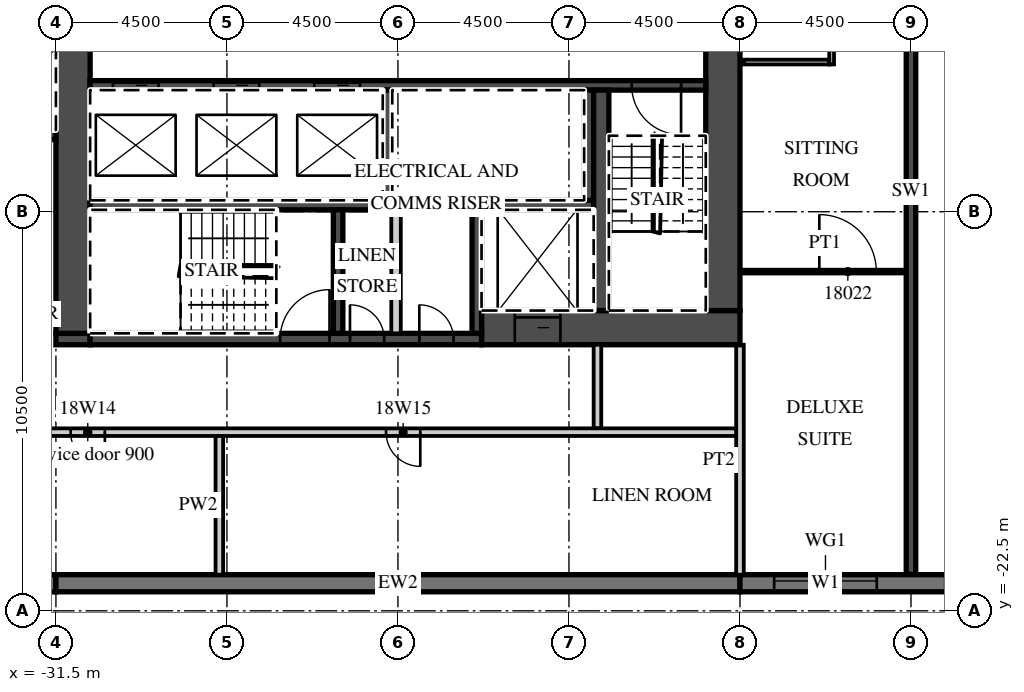
"""IFC4 building model, lengths in metres.
Left out: names, types, materials, properties, quantities, classifications, styles, units other than length and angle.
Written with IfcOpenShell. Run it as: python <this file> out.ifc"""

import sys

from ifc_helpers import new_model, si_unit, direction, frame, frame_2d, origin, place, context, subcontext, project, spatial, rectangle, extrude, element, fill, save


model = new_model("IFC4")
c1 = context("Model", 3, precision=1e-05, world=origin(), true_north=direction((0.0, 1.0)))
c2 = subcontext(c1, "Body", "Model", "MODEL_VIEW")
j1 = project(units=[si_unit("LENGTHUNIT", "METRE"), si_unit("PLANEANGLEUNIT", "RADIAN")], contexts=[c1])
p1 = place(None, origin())
s1 = spatial("IfcSite", under=j1, at=p1, CompositionType="ELEMENT")
p2 = place(p1, origin())
s2 = spatial("IfcBuilding", under=s1, at=p2, CompositionType="ELEMENT")
p3 = place(p2, frame((0.0, 0.0, 89.7)))
s3 = spatial("IfcBuildingStorey", under=s2, at=p3, CompositionType="ELEMENT", Elevation=89.7)
p4 = place(p3, frame((-9.0, -21.54, 0.0), z_axis=(0.0, 0.0, 1.0), x_axis=(0.0, 1.0, 0.0)))
e1 = element("IfcWall", 1, at=p4, inside=s3, PredefinedType="SHEAR", context=c2, shape_type="SweptSolid", body=[
    extrude(rectangle(XDim=20.14, YDim=0.25, at=frame_2d((10.07, 0.0))), origin(), (0.0, 0.0, 1.0), 3.3),
])
p5 = place(p3, frame((-41.0, -21.775, 0.0), z_axis=(0.0, 0.0, 1.0), x_axis=(1.0, 0.0, 0.0)))
e2 = element("IfcWall", 2, at=p5, inside=s3, PredefinedType="SOLIDWALL", context=c2, shape_type="SweptSolid", body=[
    extrude(rectangle(XDim=9.5, YDim=0.45, at=frame_2d((4.75, 0.0))), origin(), (0.0, 0.0, 1.0), 3.02),
])
p6 = place(p3, frame((-31.5, -21.775, 0.0), z_axis=(0.0, 0.0, 1.0), x_axis=(1.0, 0.0, 0.0)))
e3 = element("IfcWall", 3, at=p6, inside=s3, PredefinedType="SOLIDWALL", context=c2, shape_type="SweptSolid", body=[
    extrude(rectangle(XDim=18.0, YDim=0.45, at=frame_2d((9.0, 0.0))), origin(), (0.0, 0.0, 1.0), 3.02),
])
p7 = place(p3, frame((-13.5, -21.775, 0.0), z_axis=(0.0, 0.0, 1.0), x_axis=(1.0, 0.0, 0.0)))
e4 = element("IfcWall", 4, at=p7, inside=s3, PredefinedType="SOLIDWALL", context=c2, shape_type="SweptSolid", body=[
    extrude(rectangle(XDim=54.5, YDim=0.45, at=frame_2d((27.25, 0.0))), origin(), (0.0, 0.0, 1.0), 3.02),
])
p8 = place(p7, frame((0.9, 0.0, 0.45)))
e5 = element("IfcOpeningElement", 5, at=p8, cuts=e4, PredefinedType="OPENING", context=c2, shape_type="SweptSolid", body=[
    extrude(rectangle(XDim=2.7, YDim=2.25, at=frame_2d((1.35, 1.125))), frame((0.0, 0.235, 0.0), z_axis=(0.0, -1.0, 0.0), x_axis=(1.0, 0.0, 0.0)), (0.0, 0.0, 1.0), 0.47),
])
p9 = place(p7, frame((5.4, 0.0, 0.45)))
e6 = element("IfcOpeningElement", 6, at=p9, cuts=e4, PredefinedType="OPENING", context=c2, shape_type="SweptSolid", body=[
    extrude(rectangle(XDim=2.7, YDim=2.25, at=frame_2d((1.35, 1.125))), frame((0.0, 0.235, 0.0), z_axis=(0.0, -1.0, 0.0), x_axis=(1.0, 0.0, 0.0)), (0.0, 0.0, 1.0), 0.47),
])
p10 = place(p7, frame((9.9, 0.0, 0.45)))
e7 = element("IfcOpeningElement", 7, at=p10, cuts=e4, PredefinedType="OPENING", context=c2, shape_type="SweptSolid", body=[
    extrude(rectangle(XDim=2.7, YDim=2.25, at=frame_2d((1.35, 1.125))), frame((0.0, 0.235, 0.0), z_axis=(0.0, -1.0, 0.0), x_axis=(1.0, 0.0, 0.0)), (0.0, 0.0, 1.0), 0.47),
])
p11 = place(p7, frame((14.4, 0.0, 0.45)))
e8 = element("IfcOpeningElement", 8, at=p11, cuts=e4, PredefinedType="OPENING", context=c2, shape_type="SweptSolid", body=[
    extrude(rectangle(XDim=2.7, YDim=2.25, at=frame_2d((1.35, 1.125))), frame((0.0, 0.235, 0.0), z_axis=(0.0, -1.0, 0.0), x_axis=(1.0, 0.0, 0.0)), (0.0, 0.0, 1.0), 0.47),
])
p12 = place(p7, frame((18.9, 0.0, 0.45)))
e9 = element("IfcOpeningElement", 9, at=p12, cuts=e4, PredefinedType="OPENING", context=c2, shape_type="SweptSolid", body=[
    extrude(rectangle(XDim=2.7, YDim=2.25, at=frame_2d((1.35, 1.125))), frame((0.0, 0.235, 0.0), z_axis=(0.0, -1.0, 0.0), x_axis=(1.0, 0.0, 0.0)), (0.0, 0.0, 1.0), 0.47),
])
p13 = place(p7, frame((23.4, 0.0, 0.45)))
e10 = element("IfcOpeningElement", 10, at=p13, cuts=e4, PredefinedType="OPENING", context=c2, shape_type="SweptSolid", body=[
    extrude(rectangle(XDim=2.7, YDim=2.25, at=frame_2d((1.35, 1.125))), frame((0.0, 0.235, 0.0), z_axis=(0.0, -1.0, 0.0), x_axis=(1.0, 0.0, 0.0)), (0.0, 0.0, 1.0), 0.47),
])
p14 = place(p7, frame((27.9, 0.0, 0.45)))
e11 = element("IfcOpeningElement", 11, at=p14, cuts=e4, PredefinedType="OPENING", context=c2, shape_type="SweptSolid", body=[
    extrude(rectangle(XDim=2.7, YDim=2.25, at=frame_2d((1.35, 1.125))), frame((0.0, 0.235, 0.0), z_axis=(0.0, -1.0, 0.0), x_axis=(1.0, 0.0, 0.0)), (0.0, 0.0, 1.0), 0.47),
])
p15 = place(p7, frame((32.4, 0.0, 0.45)))
e12 = element("IfcOpeningElement", 12, at=p15, cuts=e4, PredefinedType="OPENING", context=c2, shape_type="SweptSolid", body=[
    extrude(rectangle(XDim=2.7, YDim=2.25, at=frame_2d((1.35, 1.125))), frame((0.0, 0.235, 0.0), z_axis=(0.0, -1.0, 0.0), x_axis=(1.0, 0.0, 0.0)), (0.0, 0.0, 1.0), 0.47),
])
p16 = place(p7, frame((36.9, 0.0, 0.45)))
e13 = element("IfcOpeningElement", 13, at=p16, cuts=e4, PredefinedType="OPENING", context=c2, shape_type="SweptSolid", body=[
    extrude(rectangle(XDim=2.7, YDim=2.25, at=frame_2d((1.35, 1.125))), frame((0.0, 0.235, 0.0), z_axis=(0.0, -1.0, 0.0), x_axis=(1.0, 0.0, 0.0)), (0.0, 0.0, 1.0), 0.47),
])
p17 = place(p7, frame((41.4, 0.0, 0.45)))
e14 = element("IfcOpeningElement", 14, at=p17, cuts=e4, PredefinedType="OPENING", context=c2, shape_type="SweptSolid", body=[
    extrude(rectangle(XDim=2.7, YDim=2.25, at=frame_2d((1.35, 1.125))), frame((0.0, 0.235, 0.0), z_axis=(0.0, -1.0, 0.0), x_axis=(1.0, 0.0, 0.0)), (0.0, 0.0, 1.0), 0.47),
])
p18 = place(p7, frame((45.9, 0.0, 0.45)))
e15 = element("IfcOpeningElement", 15, at=p18, cuts=e4, PredefinedType="OPENING", context=c2, shape_type="SweptSolid", body=[
    extrude(rectangle(XDim=2.7, YDim=2.25, at=frame_2d((1.35, 1.125))), frame((0.0, 0.235, 0.0), z_axis=(0.0, -1.0, 0.0), x_axis=(1.0, 0.0, 0.0)), (0.0, 0.0, 1.0), 0.47),
])
p19 = place(p7, frame((50.4, 0.0, 0.45)))
e16 = element("IfcOpeningElement", 16, at=p19, cuts=e4, PredefinedType="OPENING", context=c2, shape_type="SweptSolid", body=[
    extrude(rectangle(XDim=2.7, YDim=2.25, at=frame_2d((1.35, 1.125))), frame((0.0, 0.235, 0.0), z_axis=(0.0, -1.0, 0.0), x_axis=(1.0, 0.0, 0.0)), (0.0, 0.0, 1.0), 0.47),
])
p20 = place(p3, frame((-13.5, -21.55, 0.0), z_axis=(0.0, 0.0, 1.0), x_axis=(0.0, 1.0, 0.0)))
e17 = element("IfcWall", 17, at=p20, inside=s3, PredefinedType="PARTITIONING", context=c2, shape_type="SweptSolid", body=[
    extrude(rectangle(XDim=6.05, YDim=0.2, at=frame_2d((3.025, 0.0))), origin(), (0.0, 0.0, 1.0), 3.02),
])
p21 = place(p3, frame((-11.088, -8.125, 0.0), z_axis=(0.0, 0.0, 1.0), x_axis=(0.0, 1.0, 0.0)))
e18 = element("IfcWall", 18, at=p21, inside=s3, PredefinedType="PARTITIONING", context=c2, shape_type="SweptSolid", body=[
    extrude(rectangle(XDim=6.725, YDim=0.125, at=frame_2d((3.363, 0.0))), origin(), (0.0, 0.0, 1.0), 3.02),
])
p22 = place(p21, frame((3.375, 0.0, 0.0)))
e19 = element("IfcOpeningElement", 19, at=p22, cuts=e18, PredefinedType="OPENING", context=c2, shape_type="SweptSolid", body=[
    extrude(rectangle(XDim=0.9, YDim=2.1, at=frame_2d((0.45, 1.05))), frame((0.0, 0.073, 0.0), z_axis=(0.0, -1.0, 0.0), x_axis=(1.0, 0.0, 0.0)), (0.0, 0.0, 1.0), 0.145),
])
p23 = place(p3, frame((-13.4, -8.062, 0.0), z_axis=(0.0, 0.0, 1.0), x_axis=(1.0, 0.0, 0.0)))
e20 = element("IfcWall", 20, at=p23, inside=s3, PredefinedType="PARTITIONING", context=c2, shape_type="SweptSolid", body=[
    extrude(rectangle(XDim=2.25, YDim=0.125, at=frame_2d((1.125, 0.0))), origin(), (0.0, 0.0, 1.0), 3.02),
])
p24 = place(p3, frame((-13.4, -13.575, 0.0), z_axis=(0.0, 0.0, 1.0), x_axis=(1.0, 0.0, 0.0)))
e21 = element("IfcWall", 21, at=p24, inside=s3, PredefinedType="PARTITIONING", context=c2, shape_type="SweptSolid", body=[
    extrude(rectangle(XDim=4.275, YDim=0.1, at=frame_2d((2.137, 0.0))), origin(), (0.0, 0.0, 1.0), 3.02),
])
p25 = place(p24, frame((1.988, 0.0, 0.0)))
e22 = element("IfcOpeningElement", 22, at=p25, cuts=e21, PredefinedType="OPENING", context=c2, shape_type="SweptSolid", body=[
    extrude(rectangle(XDim=1.5, YDim=2.1, at=frame_2d((0.75, 1.05))), frame((0.0, 0.06, 0.0), z_axis=(0.0, -1.0, 0.0), x_axis=(1.0, 0.0, 0.0)), (0.0, 0.0, 1.0), 0.12),
])
p26 = place(p3, frame((-20.3, -15.05, 0.0), z_axis=(0.0, 0.0, 1.0), x_axis=(1.0, 0.0, 0.0)))
e23 = element("IfcWall", 23, at=p26, inside=s3, PredefinedType="SHEAR", context=c2, shape_type="SweptSolid", body=[
    extrude(rectangle(XDim=6.8, YDim=0.9, at=frame_2d((3.4, 0.0))), origin(), (0.0, 0.0, 1.0), 3.02),
])
p27 = place(p26, frame((0.875, 0.0, 0.0)))
e24 = element("IfcOpeningElement", 24, at=p27, cuts=e23, PredefinedType="OPENING", context=c2, shape_type="SweptSolid", body=[
    extrude(rectangle(XDim=1.2, YDim=2.1, at=frame_2d((0.6, 1.05))), frame((0.0, 0.46, 0.0), z_axis=(0.0, -1.0, 0.0), x_axis=(1.0, 0.0, 0.0)), (0.0, 0.0, 1.0), 0.92),
])
p28 = place(p3, frame((-31.5, -15.35, 0.0), z_axis=(0.0, 0.0, 1.0), x_axis=(1.0, 0.0, 0.0)))
e25 = element("IfcWall", 25, at=p28, inside=s3, PredefinedType="SHEAR", context=c2, shape_type="SweptSolid", body=[
    extrude(rectangle(XDim=0.9, YDim=0.3, at=frame_2d((0.45, 0.0))), origin(), (0.0, 0.0, 1.0), 3.02),
])
p29 = place(p3, frame((-30.6, -15.35, 0.0), z_axis=(0.0, 0.0, 1.0), x_axis=(1.0, 0.0, 0.0)))
e26 = element("IfcWall", 26, at=p29, inside=s3, PredefinedType="SHEAR", context=c2, shape_type="SweptSolid", body=[
    extrude(rectangle(XDim=10.3, YDim=0.3, at=frame_2d((5.15, 0.0))), origin(), (0.0, 0.0, 1.0), 3.02),
])
p30 = place(p29, frame((5.0, 0.0, 0.0)))
e27 = element("IfcOpeningElement", 27, at=p30, cuts=e26, PredefinedType="OPENING", context=c2, shape_type="SweptSolid", body=[
    extrude(rectangle(XDim=1.3, YDim=2.1, at=frame_2d((0.65, 1.05))), frame((0.0, 0.16, 0.0), z_axis=(0.0, -1.0, 0.0), x_axis=(1.0, 0.0, 0.0)), (0.0, 0.0, 1.0), 0.32),
])
p31 = place(p29, frame((6.837, 0.0, 0.0)))
e28 = element("IfcOpeningElement", 28, at=p31, cuts=e26, PredefinedType="OPENING", context=c2, shape_type="SweptSolid", body=[
    extrude(rectangle(XDim=0.9, YDim=2.1, at=frame_2d((0.45, 1.05))), frame((0.0, 0.16, 0.0), z_axis=(0.0, -1.0, 0.0), x_axis=(1.0, 0.0, 0.0)), (0.0, 0.0, 1.0), 0.32),
])
p32 = place(p29, frame((8.663, 0.0, 0.0)))
e29 = element("IfcOpeningElement", 29, at=p32, cuts=e26, PredefinedType="OPENING", context=c2, shape_type="SweptSolid", body=[
    extrude(rectangle(XDim=0.9, YDim=2.1, at=frame_2d((0.45, 1.05))), frame((0.0, 0.16, 0.0), z_axis=(0.0, -1.0, 0.0), x_axis=(1.0, 0.0, 0.0)), (0.0, 0.0, 1.0), 0.32),
])
p33 = place(p3, frame((-31.05, -15.2, 0.0), z_axis=(0.0, 0.0, 1.0), x_axis=(0.0, 1.0, 0.0)))
e30 = element("IfcWall", 30, at=p33, inside=s3, PredefinedType="SHEAR", context=c2, shape_type="SweptSolid", body=[
    extrude(rectangle(XDim=12.8, YDim=0.9, at=frame_2d((6.4, 0.0))), origin(), (0.0, 0.0, 1.0), 3.02),
])
p34 = place(p33, frame((11.5, 0.0, 0.0)))
e31 = element("IfcOpeningElement", 31, at=p34, cuts=e30, PredefinedType="OPENING", context=c2, shape_type="SweptSolid", body=[
    extrude(rectangle(XDim=1.1, YDim=2.1, at=frame_2d((0.55, 1.05))), frame((0.0, 0.46, 0.0), z_axis=(0.0, -1.0, 0.0), x_axis=(1.0, 0.0, 0.0)), (0.0, 0.0, 1.0), 0.92),
])
p35 = place(p3, frame((-13.95, -14.6, 0.0), z_axis=(0.0, 0.0, 1.0), x_axis=(0.0, 1.0, 0.0)))
e32 = element("IfcWall", 32, at=p35, inside=s3, PredefinedType="SHEAR", context=c2, shape_type="SweptSolid", body=[
    extrude(rectangle(XDim=12.2, YDim=0.9, at=frame_2d((6.1, 0.0))), origin(), (0.0, 0.0, 1.0), 3.02),
])
p36 = place(p3, frame((-30.6, -8.675, 0.0), z_axis=(0.0, 0.0, 1.0), x_axis=(1.0, 0.0, 0.0)))
e33 = element("IfcWall", 33, at=p36, inside=s3, PredefinedType="SHEAR", context=c2, shape_type="SweptSolid", body=[
    extrude(rectangle(XDim=16.2, YDim=0.25, at=frame_2d((8.1, 0.0))), origin(), (0.0, 0.0, 1.0), 3.02),
])
p37 = place(p36, frame((0.6, 0.0, 0.0)))
e34 = element("IfcOpeningElement", 34, at=p37, cuts=e33, PredefinedType="OPENING", context=c2, shape_type="SweptSolid", body=[
    extrude(rectangle(XDim=1.2, YDim=2.1, at=frame_2d((0.6, 1.05))), frame((0.0, 0.135, 0.0), z_axis=(0.0, -1.0, 0.0), x_axis=(1.0, 0.0, 0.0)), (0.0, 0.0, 1.0), 0.27),
])
p38 = place(p36, frame((3.25, 0.0, 0.0)))
e35 = element("IfcOpeningElement", 35, at=p38, cuts=e33, PredefinedType="OPENING", context=c2, shape_type="SweptSolid", body=[
    extrude(rectangle(XDim=1.2, YDim=2.1, at=frame_2d((0.6, 1.05))), frame((0.0, 0.135, 0.0), z_axis=(0.0, -1.0, 0.0), x_axis=(1.0, 0.0, 0.0)), (0.0, 0.0, 1.0), 0.27),
])
p39 = place(p36, frame((5.9, 0.0, 0.0)))
e36 = element("IfcOpeningElement", 36, at=p39, cuts=e33, PredefinedType="OPENING", context=c2, shape_type="SweptSolid", body=[
    extrude(rectangle(XDim=1.2, YDim=2.1, at=frame_2d((0.6, 1.05))), frame((0.0, 0.135, 0.0), z_axis=(0.0, -1.0, 0.0), x_axis=(1.0, 0.0, 0.0)), (0.0, 0.0, 1.0), 0.27),
])
p40 = place(p36, frame((14.25, 0.0, 0.0)))
e37 = element("IfcOpeningElement", 37, at=p40, cuts=e33, PredefinedType="OPENING", context=c2, shape_type="SweptSolid", body=[
    extrude(rectangle(XDim=1.3, YDim=2.1, at=frame_2d((0.65, 1.05))), frame((0.0, 0.135, 0.0), z_axis=(0.0, -1.0, 0.0), x_axis=(1.0, 0.0, 0.0)), (0.0, 0.0, 1.0), 0.27),
])
p41 = place(p3, frame((-30.6, -11.825, 0.0), z_axis=(0.0, 0.0, 1.0), x_axis=(1.0, 0.0, 0.0)))
e38 = element("IfcWall", 38, at=p41, inside=s3, PredefinedType="SHEAR", context=c2, shape_type="SweptSolid", body=[
    extrude(rectangle(XDim=13.25, YDim=0.25, at=frame_2d((6.625, 0.0))), origin(), (0.0, 0.0, 1.0), 3.02),
])
for number, where, z_axis, x_axis in (
    (39, (-17.475, -11.7, 0.0), (0.0, 0.0, 1.0), (0.0, 1.0, 0.0)),
    (40, (-22.775, -11.7, 0.0), (0.0, 0.0, 1.0), (0.0, 1.0, 0.0)),
):
    element("IfcWall", number, at=place(p3, frame(where, z_axis=z_axis, x_axis=x_axis)), inside=s3, PredefinedType="SHEAR", context=c2, shape_type="SweptSolid", body=[
        extrude(rectangle(XDim=2.9, YDim=0.25, at=frame_2d((1.45, 0.0))), origin(), (0.0, 0.0, 1.0), 3.02),
    ])
p42 = place(p3, frame((-17.15, -14.6, 0.0), z_axis=(0.0, 0.0, 1.0), x_axis=(0.0, 1.0, 0.0)))
e41 = element("IfcWall", 41, at=p42, inside=s3, PredefinedType="SHEAR", context=c2, shape_type="SweptSolid", body=[
    extrude(rectangle(XDim=5.8, YDim=0.4, at=frame_2d((2.9, 0.0))), origin(), (0.0, 0.0, 1.0), 3.02),
])
for number, where, z_axis, x_axis in (
    (42, (-20.425, -15.2, 0.0), (0.0, 0.0, 1.0), (0.0, 1.0, 0.0)),
    (43, (-24.075, -15.2, 0.0), (0.0, 0.0, 1.0), (0.0, 1.0, 0.0)),
):
    element("IfcWall", number, at=place(p3, frame(where, z_axis=z_axis, x_axis=x_axis)), inside=s3, PredefinedType="SHEAR", context=c2, shape_type="SweptSolid", body=[
        extrude(rectangle(XDim=3.25, YDim=0.25, at=frame_2d((1.625, 0.0))), origin(), (0.0, 0.0, 1.0), 3.02),
    ])
p43 = place(p3, frame((-22.55, -15.2, 0.0), z_axis=(0.0, 0.0, 1.0), x_axis=(0.0, 1.0, 0.0)))
e44 = element("IfcWall", 44, at=p43, inside=s3, PredefinedType="PARTITIONING", context=c2, shape_type="SweptSolid", body=[
    extrude(rectangle(XDim=3.25, YDim=0.25, at=frame_2d((1.625, 0.0))), origin(), (0.0, 0.0, 1.0), 3.02),
])
p44 = place(p3, frame((-34.05, -9.975, 0.0), z_axis=(0.0, 0.0, 1.0), x_axis=(1.0, 0.0, 0.0)))
e45 = element("IfcWall", 45, at=p44, inside=s3, PredefinedType="SHEAR", context=c2, shape_type="SweptSolid", body=[
    extrude(rectangle(XDim=2.55, YDim=0.25, at=frame_2d((1.275, 0.0))), origin(), (0.0, 0.0, 1.0), 3.02),
])
p45 = place(p3, frame((-17.25, -17.7, 0.0), z_axis=(0.0, 0.0, 1.0), x_axis=(0.0, 1.0, 0.0)))
e46 = element("IfcWall", 46, at=p45, inside=s3, PredefinedType="PARTITIONING", context=c2, shape_type="SweptSolid", body=[
    extrude(rectangle(XDim=2.2, YDim=0.2, at=frame_2d((1.1, 0.0))), origin(), (0.0, 0.0, 1.0), 3.02),
])
p46 = place(p3, frame((-44.55, -17.8, 0.0), z_axis=(0.0, 0.0, 1.0), x_axis=(1.0, 0.0, 0.0)))
e47 = element("IfcWall", 47, at=p46, inside=s3, PredefinedType="PARTITIONING", context=c2, shape_type="SweptSolid", body=[
    extrude(rectangle(XDim=30.95, YDim=0.2, at=frame_2d((15.475, 0.0))), origin(), (0.0, 0.0, 1.0), 3.02),
])
p47 = place(p46, frame((13.438, 0.0, 0.0)))
e48 = element("IfcOpeningElement", 48, at=p47, cuts=e47, PredefinedType="OPENING", context=c2, shape_type="SweptSolid", body=[
    extrude(rectangle(XDim=0.9, YDim=2.1, at=frame_2d((0.45, 1.05))), frame((0.0, 0.11, 0.0), z_axis=(0.0, -1.0, 0.0), x_axis=(1.0, 0.0, 0.0)), (0.0, 0.0, 1.0), 0.22),
])
p48 = place(p46, frame((21.738, 0.0, 0.0)))
e49 = element("IfcOpeningElement", 49, at=p48, cuts=e47, PredefinedType="OPENING", context=c2, shape_type="SweptSolid", body=[
    extrude(rectangle(XDim=0.9, YDim=2.1, at=frame_2d((0.45, 1.05))), frame((0.0, 0.11, 0.0), z_axis=(0.0, -1.0, 0.0), x_axis=(1.0, 0.0, 0.0)), (0.0, 0.0, 1.0), 0.22),
])
p49 = place(p3, frame((-27.2, -21.55, 0.0), z_axis=(0.0, 0.0, 1.0), x_axis=(0.0, 1.0, 0.0)))
e50 = element("IfcWall", 50, at=p49, inside=s3, PredefinedType="PARTITIONING", context=c2, shape_type="SweptSolid", body=[
    extrude(rectangle(XDim=3.65, YDim=0.2, at=frame_2d((1.825, 0.0))), origin(), (0.0, 0.0, 1.0), 3.02),
])
p50 = place(p8, origin())
e51 = element("IfcWindow", 51, at=p50, inside=s3, PartitioningType="SINGLE_PANEL", PredefinedType="WINDOW", context=c2, shape_type="SweptSolid", body=[
    extrude(rectangle(XDim=2.7, YDim=2.25, at=frame_2d((1.35, 1.125))), frame((0.0, 0.09, 0.0), z_axis=(0.0, -1.0, 0.0), x_axis=(1.0, 0.0, 0.0)), (0.0, 0.0, 1.0), 0.06),
])
fill(e5, e51)
p51 = place(p25, origin())
e52 = element("IfcDoor", 52, at=p51, inside=s3, OperationType="SINGLE_SWING_LEFT", PredefinedType="DOOR", context=c2, shape_type="SweptSolid", body=[
    extrude(rectangle(XDim=1.5, YDim=2.1, at=frame_2d((0.75, 1.05))), frame((0.0, 0.025, 0.0), z_axis=(0.0, -1.0, 0.0), x_axis=(1.0, 0.0, 0.0)), (0.0, 0.0, 1.0), 0.05),
])
fill(e22, e52)
p52 = place(p37, origin())
e53 = element("IfcDoor", 53, at=p52, inside=s3, OperationType="SLIDING_TO_LEFT", PredefinedType="DOOR", context=c2, shape_type="SweptSolid", body=[
    extrude(rectangle(XDim=1.2, YDim=2.1, at=frame_2d((0.6, 1.05))), frame((0.0, 0.025, 0.0), z_axis=(0.0, -1.0, 0.0), x_axis=(1.0, 0.0, 0.0)), (0.0, 0.0, 1.0), 0.05),
])
fill(e34, e53)
p53 = place(p38, origin())
e54 = element("IfcDoor", 54, at=p53, inside=s3, OperationType="SLIDING_TO_RIGHT", PredefinedType="DOOR", context=c2, shape_type="SweptSolid", body=[
    extrude(rectangle(XDim=1.2, YDim=2.1, at=frame_2d((0.6, 1.05))), frame((0.0, 0.025, 0.0), z_axis=(0.0, -1.0, 0.0), x_axis=(1.0, 0.0, 0.0)), (0.0, 0.0, 1.0), 0.05),
])
fill(e35, e54)
p54 = place(p39, origin())
e55 = element("IfcDoor", 55, at=p54, inside=s3, OperationType="SLIDING_TO_RIGHT", PredefinedType="DOOR", context=c2, shape_type="SweptSolid", body=[
    extrude(rectangle(XDim=1.2, YDim=2.1, at=frame_2d((0.6, 1.05))), frame((0.0, 0.025, 0.0), z_axis=(0.0, -1.0, 0.0), x_axis=(1.0, 0.0, 0.0)), (0.0, 0.0, 1.0), 0.05),
])
fill(e36, e55)
p55 = place(p27, origin())
e56 = element("IfcDoor", 56, at=p55, inside=s3, OperationType="SLIDING_TO_LEFT", PredefinedType="DOOR", context=c2, shape_type="SweptSolid", body=[
    extrude(rectangle(XDim=1.2, YDim=2.1, at=frame_2d((0.6, 1.05))), frame((0.0, 0.025, 0.0), z_axis=(0.0, -1.0, 0.0), x_axis=(1.0, 0.0, 0.0)), (0.0, 0.0, 1.0), 0.05),
])
fill(e24, e56)
p56 = place(p40, origin())
e57 = element("IfcDoor", 57, at=p56, inside=s3, OperationType="SINGLE_SWING_RIGHT", PredefinedType="DOOR", context=c2, shape_type="SweptSolid", body=[
    extrude(rectangle(XDim=1.3, YDim=2.1, at=frame_2d((0.65, 1.05))), frame((0.0, 0.025, 0.0), z_axis=(0.0, -1.0, 0.0), x_axis=(1.0, 0.0, 0.0)), (0.0, 0.0, 1.0), 0.05),
])
fill(e37, e57)
p57 = place(p30, origin())
e58 = element("IfcDoor", 58, at=p57, inside=s3, OperationType="SINGLE_SWING_RIGHT", PredefinedType="DOOR", context=c2, shape_type="SweptSolid", body=[
    extrude(rectangle(XDim=1.3, YDim=2.1, at=frame_2d((0.65, 1.05))), frame((0.0, 0.025, 0.0), z_axis=(0.0, -1.0, 0.0), x_axis=(1.0, 0.0, 0.0)), (0.0, 0.0, 1.0), 0.05),
])
fill(e27, e58)
p58 = place(p31, origin())
e59 = element("IfcDoor", 59, at=p58, inside=s3, OperationType="SINGLE_SWING_LEFT", PredefinedType="DOOR", context=c2, shape_type="SweptSolid", body=[
    extrude(rectangle(XDim=0.9, YDim=2.1, at=frame_2d((0.45, 1.05))), frame((0.0, 0.025, 0.0), z_axis=(0.0, -1.0, 0.0), x_axis=(1.0, 0.0, 0.0)), (0.0, 0.0, 1.0), 0.05),
])
fill(e28, e59)
p59 = place(p32, origin())
e60 = element("IfcDoor", 60, at=p59, inside=s3, OperationType="SINGLE_SWING_LEFT", PredefinedType="DOOR", context=c2, shape_type="SweptSolid", body=[
    extrude(rectangle(XDim=0.9, YDim=2.1, at=frame_2d((0.45, 1.05))), frame((0.0, 0.025, 0.0), z_axis=(0.0, -1.0, 0.0), x_axis=(1.0, 0.0, 0.0)), (0.0, 0.0, 1.0), 0.05),
])
fill(e29, e60)
p60 = place(p47, origin())
e61 = element("IfcDoor", 61, at=p60, inside=s3, OperationType="SINGLE_SWING_RIGHT", PredefinedType="DOOR", context=c2, shape_type="SweptSolid", body=[
    extrude(rectangle(XDim=0.9, YDim=2.1, at=frame_2d((0.45, 1.05))), frame((0.0, 0.025, 0.0), z_axis=(0.0, -1.0, 0.0), x_axis=(1.0, 0.0, 0.0)), (0.0, 0.0, 1.0), 0.05),
])
fill(e48, e61)
p61 = place(p48, origin())
e62 = element("IfcDoor", 62, at=p61, inside=s3, OperationType="SINGLE_SWING_RIGHT", PredefinedType="DOOR", context=c2, shape_type="SweptSolid", body=[
    extrude(rectangle(XDim=0.9, YDim=2.1, at=frame_2d((0.45, 1.05))), frame((0.0, 0.025, 0.0), z_axis=(0.0, -1.0, 0.0), x_axis=(1.0, 0.0, 0.0)), (0.0, 0.0, 1.0), 0.05),
])
fill(e49, e62)
save(model, sys.argv[1])
